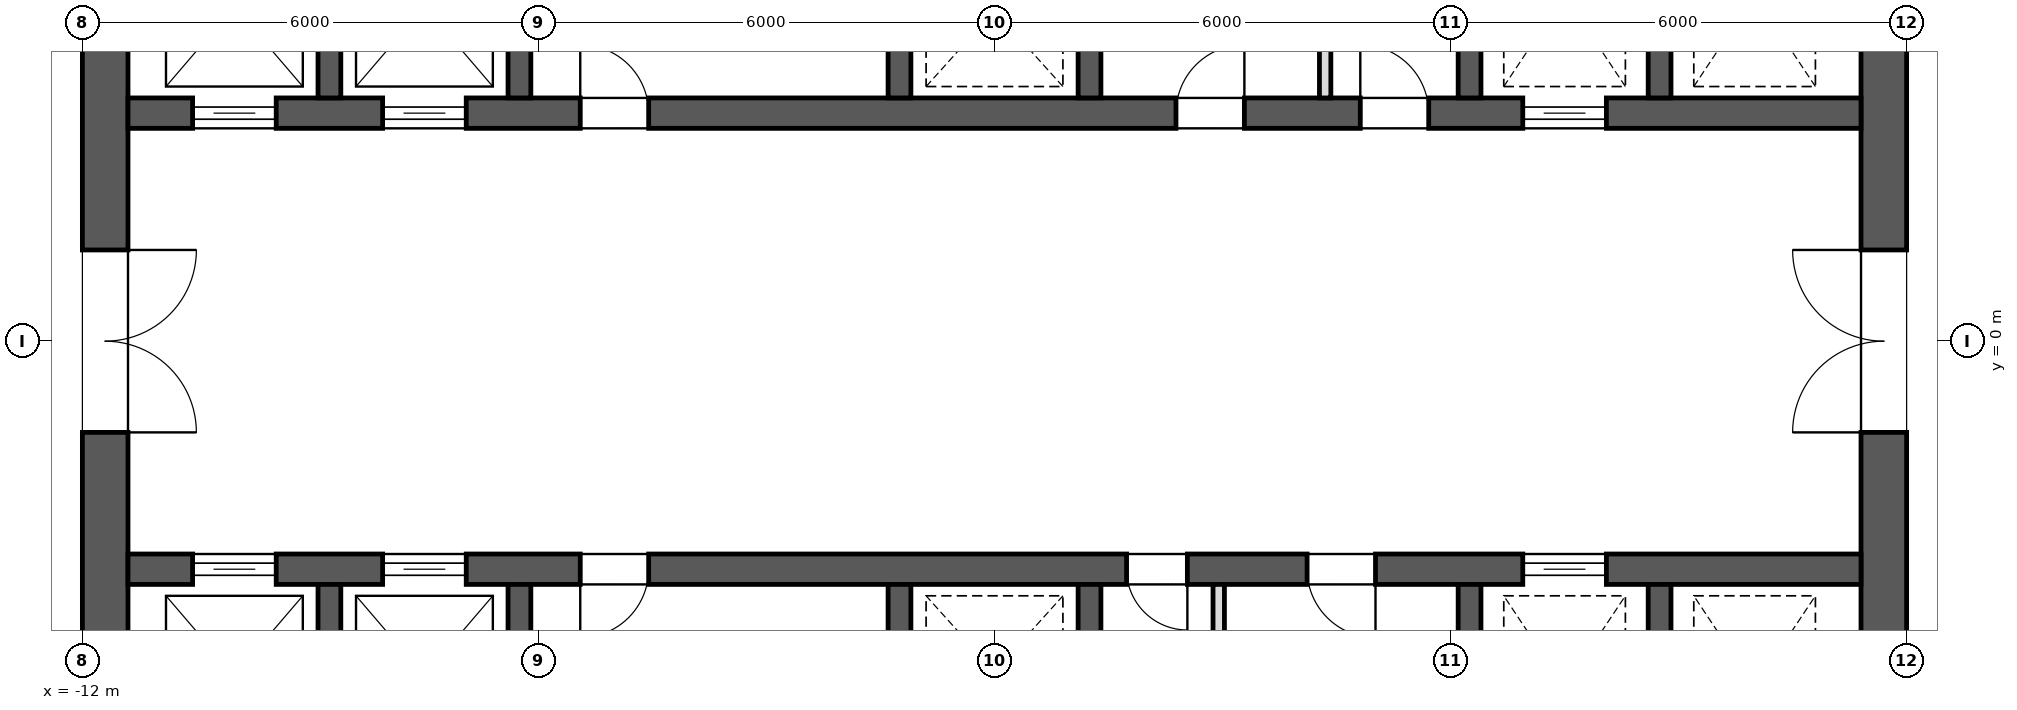
"""IFC4 building model, lengths in metres.
Left out: names, types, materials, properties, quantities, classifications, styles, units other than length and angle.
Written with IfcOpenShell. Run it as: python <this file> out.ifc"""

import sys

from ifc_helpers import new_model, si_unit, direction, frame, frame_2d, origin, place, context, subcontext, project, spatial, rectangle, extrude, element, fill, save


model = new_model("IFC4")
c1 = context("Model", 3, precision=1e-05, world=origin(), true_north=direction((0.0, 1.0)))
c2 = subcontext(c1, "Body", "Model", "MODEL_VIEW")
j1 = project(units=[si_unit("LENGTHUNIT", "METRE"), si_unit("PLANEANGLEUNIT", "RADIAN")], contexts=[c1])
p1 = place(None, origin())
s1 = spatial("IfcSite", under=j1, at=p1, CompositionType="ELEMENT")
p2 = place(p1, origin())
s2 = spatial("IfcBuilding", under=s1, at=p2, CompositionType="ELEMENT")
p3 = place(p2, frame((0.0, 0.0, 256.3)))
s3 = spatial("IfcBuildingStorey", under=s2, at=p3, CompositionType="ELEMENT", Elevation=256.3)
p4 = place(p3, frame((11.7, -11.4, 0.0), z_axis=(0.0, 0.0, 1.0), x_axis=(0.0, 1.0, 0.0)))
e1 = element("IfcWall", 1, at=p4, inside=s3, PredefinedType="SHEAR", context=c2, shape_type="SweptSolid", body=[
    extrude(rectangle(XDim=22.8, YDim=0.6, at=frame_2d((11.4, 0.0))), origin(), (0.0, 0.0, 1.0), 4.0),
])
p5 = place(p4, frame((10.2, 0.0, 0.0)))
e2 = element("IfcOpeningElement", 2, at=p5, cuts=e1, PredefinedType="OPENING", context=c2, shape_type="SweptSolid", body=[
    extrude(rectangle(XDim=2.4, YDim=2.1, at=frame_2d((1.2, 1.05))), frame((0.0, 0.312, 0.0), z_axis=(0.0, -1.0, 0.0), x_axis=(1.0, 0.0, 0.0)), (0.0, 0.0, 1.0), 0.624),
])
p6 = place(p4, frame((19.5, 0.0, 0.0)))
e3 = element("IfcOpeningElement", 3, at=p6, cuts=e1, PredefinedType="OPENING", context=c2, shape_type="SweptSolid", body=[
    extrude(rectangle(XDim=1.2, YDim=2.1, at=frame_2d((0.6, 1.05))), frame((0.0, 0.312, 0.0), z_axis=(0.0, -1.0, 0.0), x_axis=(1.0, 0.0, 0.0)), (0.0, 0.0, 1.0), 0.624),
])
p7 = place(p4, frame((2.1, 0.0, 0.0)))
e4 = element("IfcOpeningElement", 4, at=p7, cuts=e1, PredefinedType="OPENING", context=c2, shape_type="SweptSolid", body=[
    extrude(rectangle(XDim=1.2, YDim=2.1, at=frame_2d((0.6, 1.05))), frame((0.0, 0.312, 0.0), z_axis=(0.0, -1.0, 0.0), x_axis=(1.0, 0.0, 0.0)), (0.0, 0.0, 1.0), 0.624),
])
p8 = place(p3, frame((-11.7, -11.4, 0.0), z_axis=(0.0, 0.0, 1.0), x_axis=(0.0, 1.0, 0.0)))
e5 = element("IfcWall", 5, at=p8, inside=s3, PredefinedType="SHEAR", context=c2, shape_type="SweptSolid", body=[
    extrude(rectangle(XDim=22.8, YDim=0.6, at=frame_2d((11.4, 0.0))), origin(), (0.0, 0.0, 1.0), 4.0),
])
p9 = place(p8, frame((10.2, 0.0, 0.0)))
e6 = element("IfcOpeningElement", 6, at=p9, cuts=e5, PredefinedType="OPENING", context=c2, shape_type="SweptSolid", body=[
    extrude(rectangle(XDim=2.4, YDim=2.1, at=frame_2d((1.2, 1.05))), frame((0.0, 0.312, 0.0), z_axis=(0.0, -1.0, 0.0), x_axis=(1.0, 0.0, 0.0)), (0.0, 0.0, 1.0), 0.624),
])
p10 = place(p8, frame((18.925, 0.0, 0.0)))
e7 = element("IfcOpeningElement", 7, at=p10, cuts=e5, PredefinedType="OPENING", context=c2, shape_type="SweptSolid", body=[
    extrude(rectangle(XDim=1.2, YDim=2.1, at=frame_2d((0.6, 1.05))), frame((0.0, 0.312, 0.0), z_axis=(0.0, -1.0, 0.0), x_axis=(1.0, 0.0, 0.0)), (0.0, 0.0, 1.0), 0.624),
])
p11 = place(p8, frame((2.675, 0.0, 0.0)))
e8 = element("IfcOpeningElement", 8, at=p11, cuts=e5, PredefinedType="OPENING", context=c2, shape_type="SweptSolid", body=[
    extrude(rectangle(XDim=1.2, YDim=2.1, at=frame_2d((0.6, 1.05))), frame((0.0, 0.312, 0.0), z_axis=(0.0, -1.0, 0.0), x_axis=(1.0, 0.0, 0.0)), (0.0, 0.0, 1.0), 0.624),
])
p12 = place(p3, frame((-11.4, 3.0, 0.0), z_axis=(0.0, 0.0, 1.0), x_axis=(1.0, 0.0, 0.0)))
e9 = element("IfcWall", 9, at=p12, inside=s3, PredefinedType="SHEAR", context=c2, shape_type="SweptSolid", body=[
    extrude(rectangle(XDim=22.8, YDim=0.4, at=frame_2d((11.4, 0.0))), origin(), (0.0, 0.0, 1.0), 4.0),
])
p13 = place(p12, frame((0.85, 0.0, 0.0)))
e10 = element("IfcOpeningElement", 10, at=p13, cuts=e9, PredefinedType="OPENING", context=c2, shape_type="SweptSolid", body=[
    extrude(rectangle(XDim=1.1, YDim=2.1, at=frame_2d((0.55, 1.05))), frame((0.0, 0.212, 0.0), z_axis=(0.0, -1.0, 0.0), x_axis=(1.0, 0.0, 0.0)), (0.0, 0.0, 1.0), 0.424),
])
p14 = place(p12, frame((3.35, 0.0, 0.0)))
e11 = element("IfcOpeningElement", 11, at=p14, cuts=e9, PredefinedType="OPENING", context=c2, shape_type="SweptSolid", body=[
    extrude(rectangle(XDim=1.1, YDim=2.1, at=frame_2d((0.55, 1.05))), frame((0.0, 0.212, 0.0), z_axis=(0.0, -1.0, 0.0), x_axis=(1.0, 0.0, 0.0)), (0.0, 0.0, 1.0), 0.424),
])
p15 = place(p12, frame((18.35, 0.0, 0.0)))
e12 = element("IfcOpeningElement", 12, at=p15, cuts=e9, PredefinedType="OPENING", context=c2, shape_type="SweptSolid", body=[
    extrude(rectangle(XDim=1.1, YDim=2.1, at=frame_2d((0.55, 1.05))), frame((0.0, 0.212, 0.0), z_axis=(0.0, -1.0, 0.0), x_axis=(1.0, 0.0, 0.0)), (0.0, 0.0, 1.0), 0.424),
])
p16 = place(p12, frame((13.788, 0.0, 0.0)))
e13 = element("IfcOpeningElement", 13, at=p16, cuts=e9, PredefinedType="OPENING", context=c2, shape_type="SweptSolid", body=[
    extrude(rectangle(XDim=0.9, YDim=2.1, at=frame_2d((0.45, 1.05))), frame((0.0, 0.212, 0.0), z_axis=(0.0, -1.0, 0.0), x_axis=(1.0, 0.0, 0.0)), (0.0, 0.0, 1.0), 0.424),
])
p17 = place(p12, frame((16.212, 0.0, 0.0)))
e14 = element("IfcOpeningElement", 14, at=p17, cuts=e9, PredefinedType="OPENING", context=c2, shape_type="SweptSolid", body=[
    extrude(rectangle(XDim=0.9, YDim=2.1, at=frame_2d((0.45, 1.05))), frame((0.0, 0.212, 0.0), z_axis=(0.0, -1.0, 0.0), x_axis=(1.0, 0.0, 0.0)), (0.0, 0.0, 1.0), 0.424),
])
p18 = place(p12, frame((5.95, 0.0, 0.0)))
e15 = element("IfcOpeningElement", 15, at=p18, cuts=e9, PredefinedType="OPENING", context=c2, shape_type="SweptSolid", body=[
    extrude(rectangle(XDim=0.9, YDim=2.1, at=frame_2d((0.45, 1.05))), frame((0.0, 0.212, 0.0), z_axis=(0.0, -1.0, 0.0), x_axis=(1.0, 0.0, 0.0)), (0.0, 0.0, 1.0), 0.424),
])
for number, where, z_axis, x_axis in (
    (16, (-8.75, 3.2, 0.0), (0.0, 0.0, 1.0), (0.0, 1.0, 0.0)),
    (17, (-6.25, 3.2, 0.0), (0.0, 0.0, 1.0), (0.0, 1.0, 0.0)),
    (18, (-1.25, 3.2, 0.0), (0.0, 0.0, 1.0), (0.0, 1.0, 0.0)),
    (19, (1.25, 3.2, 0.0), (0.0, 0.0, 1.0), (0.0, 1.0, 0.0)),
    (20, (6.25, 3.2, 0.0), (0.0, 0.0, 1.0), (0.0, 1.0, 0.0)),
    (21, (8.75, 3.2, 0.0), (0.0, 0.0, 1.0), (0.0, 1.0, 0.0)),
):
    element("IfcWall", number, at=place(p3, frame(where, z_axis=z_axis, x_axis=x_axis)), inside=s3, PredefinedType="SHEAR", context=c2, shape_type="SweptSolid", body=[
        extrude(rectangle(XDim=2.9, YDim=0.3, at=frame_2d((1.45, 0.0))), origin(), (0.0, 0.0, 1.0), 4.0),
    ])
p19 = place(p3, frame((-11.4, -3.0, 0.0), z_axis=(0.0, 0.0, 1.0), x_axis=(1.0, 0.0, 0.0)))
e22 = element("IfcWall", 22, at=p19, inside=s3, PredefinedType="SHEAR", context=c2, shape_type="SweptSolid", body=[
    extrude(rectangle(XDim=22.8, YDim=0.4, at=frame_2d((11.4, 0.0))), origin(), (0.0, 0.0, 1.0), 4.0),
])
p20 = place(p19, frame((0.85, 0.0, 0.0)))
e23 = element("IfcOpeningElement", 23, at=p20, cuts=e22, PredefinedType="OPENING", context=c2, shape_type="SweptSolid", body=[
    extrude(rectangle(XDim=1.1, YDim=2.1, at=frame_2d((0.55, 1.05))), frame((0.0, 0.212, 0.0), z_axis=(0.0, -1.0, 0.0), x_axis=(1.0, 0.0, 0.0)), (0.0, 0.0, 1.0), 0.424),
])
p21 = place(p19, frame((3.35, 0.0, 0.0)))
e24 = element("IfcOpeningElement", 24, at=p21, cuts=e22, PredefinedType="OPENING", context=c2, shape_type="SweptSolid", body=[
    extrude(rectangle(XDim=1.1, YDim=2.1, at=frame_2d((0.55, 1.05))), frame((0.0, 0.212, 0.0), z_axis=(0.0, -1.0, 0.0), x_axis=(1.0, 0.0, 0.0)), (0.0, 0.0, 1.0), 0.424),
])
p22 = place(p19, frame((18.35, 0.0, 0.0)))
e25 = element("IfcOpeningElement", 25, at=p22, cuts=e22, PredefinedType="OPENING", context=c2, shape_type="SweptSolid", body=[
    extrude(rectangle(XDim=1.1, YDim=2.1, at=frame_2d((0.55, 1.05))), frame((0.0, 0.212, 0.0), z_axis=(0.0, -1.0, 0.0), x_axis=(1.0, 0.0, 0.0)), (0.0, 0.0, 1.0), 0.424),
])
p23 = place(p19, frame((13.137, 0.0, 0.0)))
e26 = element("IfcOpeningElement", 26, at=p23, cuts=e22, PredefinedType="OPENING", context=c2, shape_type="SweptSolid", body=[
    extrude(rectangle(XDim=0.8, YDim=2.1, at=frame_2d((0.4, 1.05))), frame((0.0, 0.212, 0.0), z_axis=(0.0, -1.0, 0.0), x_axis=(1.0, 0.0, 0.0)), (0.0, 0.0, 1.0), 0.424),
])
p24 = place(p19, frame((15.512, 0.0, 0.0)))
e27 = element("IfcOpeningElement", 27, at=p24, cuts=e22, PredefinedType="OPENING", context=c2, shape_type="SweptSolid", body=[
    extrude(rectangle(XDim=0.9, YDim=2.1, at=frame_2d((0.45, 1.05))), frame((0.0, 0.212, 0.0), z_axis=(0.0, -1.0, 0.0), x_axis=(1.0, 0.0, 0.0)), (0.0, 0.0, 1.0), 0.424),
])
p25 = place(p19, frame((5.95, 0.0, 0.0)))
e28 = element("IfcOpeningElement", 28, at=p25, cuts=e22, PredefinedType="OPENING", context=c2, shape_type="SweptSolid", body=[
    extrude(rectangle(XDim=0.9, YDim=2.1, at=frame_2d((0.45, 1.05))), frame((0.0, 0.212, 0.0), z_axis=(0.0, -1.0, 0.0), x_axis=(1.0, 0.0, 0.0)), (0.0, 0.0, 1.0), 0.424),
])
for number, where, z_axis, x_axis in (
    (29, (-8.75, -6.1, 0.0), (0.0, 0.0, 1.0), (0.0, 1.0, 0.0)),
    (30, (-6.25, -6.1, 0.0), (0.0, 0.0, 1.0), (0.0, 1.0, 0.0)),
    (31, (-1.25, -6.1, 0.0), (0.0, 0.0, 1.0), (0.0, 1.0, 0.0)),
    (32, (1.25, -6.1, 0.0), (0.0, 0.0, 1.0), (0.0, 1.0, 0.0)),
    (33, (6.25, -6.1, 0.0), (0.0, 0.0, 1.0), (0.0, 1.0, 0.0)),
    (34, (8.75, -6.1, 0.0), (0.0, 0.0, 1.0), (0.0, 1.0, 0.0)),
):
    element("IfcWall", number, at=place(p3, frame(where, z_axis=z_axis, x_axis=x_axis)), inside=s3, PredefinedType="SHEAR", context=c2, shape_type="SweptSolid", body=[
        extrude(rectangle(XDim=2.9, YDim=0.3, at=frame_2d((1.45, 0.0))), origin(), (0.0, 0.0, 1.0), 4.0),
    ])
for number, where, z_axis, x_axis in (
    (35, (4.35, 3.2, 0.0), (0.0, 0.0, 1.0), (0.0, 1.0, 0.0)),
    (36, (2.95, -6.1, 0.0), (0.0, 0.0, 1.0), (0.0, 1.0, 0.0)),
):
    element("IfcWall", number, at=place(p3, frame(where, z_axis=z_axis, x_axis=x_axis)), inside=s3, PredefinedType="PARTITIONING", context=c2, shape_type="SweptSolid", body=[
        extrude(rectangle(XDim=2.9, YDim=0.15, at=frame_2d((1.45, 0.0))), origin(), (0.0, 0.0, 1.0), 3.7),
    ])
p26 = place(p13, origin())
e37 = element("IfcDoor", 37, at=p26, inside=s3, OperationType="SLIDING_TO_LEFT", PredefinedType="DOOR", context=c2, shape_type="SweptSolid", body=[
    extrude(rectangle(XDim=1.1, YDim=2.1, at=frame_2d((0.55, 1.05))), frame((0.0, 0.025, 0.0), z_axis=(0.0, -1.0, 0.0), x_axis=(1.0, 0.0, 0.0)), (0.0, 0.0, 1.0), 0.05),
])
fill(e10, e37)
p27 = place(p14, origin())
e38 = element("IfcDoor", 38, at=p27, inside=s3, OperationType="SLIDING_TO_LEFT", PredefinedType="DOOR", context=c2, shape_type="SweptSolid", body=[
    extrude(rectangle(XDim=1.1, YDim=2.1, at=frame_2d((0.55, 1.05))), frame((0.0, 0.025, 0.0), z_axis=(0.0, -1.0, 0.0), x_axis=(1.0, 0.0, 0.0)), (0.0, 0.0, 1.0), 0.05),
])
fill(e11, e38)
p28 = place(p20, origin())
e39 = element("IfcDoor", 39, at=p28, inside=s3, OperationType="SLIDING_TO_LEFT", PredefinedType="DOOR", context=c2, shape_type="SweptSolid", body=[
    extrude(rectangle(XDim=1.1, YDim=2.1, at=frame_2d((0.55, 1.05))), frame((0.0, 0.025, 0.0), z_axis=(0.0, -1.0, 0.0), x_axis=(1.0, 0.0, 0.0)), (0.0, 0.0, 1.0), 0.05),
])
fill(e23, e39)
p29 = place(p21, origin())
e40 = element("IfcDoor", 40, at=p29, inside=s3, OperationType="SLIDING_TO_LEFT", PredefinedType="DOOR", context=c2, shape_type="SweptSolid", body=[
    extrude(rectangle(XDim=1.1, YDim=2.1, at=frame_2d((0.55, 1.05))), frame((0.0, 0.025, 0.0), z_axis=(0.0, -1.0, 0.0), x_axis=(1.0, 0.0, 0.0)), (0.0, 0.0, 1.0), 0.05),
])
fill(e24, e40)
p30 = place(p15, origin())
e41 = element("IfcDoor", 41, at=p30, inside=s3, OperationType="SLIDING_TO_LEFT", PredefinedType="DOOR", context=c2, shape_type="SweptSolid", body=[
    extrude(rectangle(XDim=1.1, YDim=2.1, at=frame_2d((0.55, 1.05))), frame((0.0, 0.025, 0.0), z_axis=(0.0, -1.0, 0.0), x_axis=(1.0, 0.0, 0.0)), (0.0, 0.0, 1.0), 0.05),
])
fill(e12, e41)
p31 = place(p22, origin())
e42 = element("IfcDoor", 42, at=p31, inside=s3, OperationType="SLIDING_TO_LEFT", PredefinedType="DOOR", context=c2, shape_type="SweptSolid", body=[
    extrude(rectangle(XDim=1.1, YDim=2.1, at=frame_2d((0.55, 1.05))), frame((0.0, 0.025, 0.0), z_axis=(0.0, -1.0, 0.0), x_axis=(1.0, 0.0, 0.0)), (0.0, 0.0, 1.0), 0.05),
])
fill(e25, e42)
p32 = place(p9, frame((2.4, 0.0, 0.0), z_axis=(0.0, 0.0, 1.0), x_axis=(-1.0, 0.0, 0.0)))
e43 = element("IfcDoor", 43, at=p32, inside=s3, OperationType="DOUBLE_DOOR_SINGLE_SWING", PredefinedType="DOOR", context=c2, shape_type="SweptSolid", body=[
    extrude(rectangle(XDim=2.4, YDim=2.1, at=frame_2d((1.2, 1.05))), frame((0.0, 0.025, 0.0), z_axis=(0.0, -1.0, 0.0), x_axis=(1.0, 0.0, 0.0)), (0.0, 0.0, 1.0), 0.05),
])
fill(e6, e43)
p33 = place(p5, origin())
e44 = element("IfcDoor", 44, at=p33, inside=s3, OperationType="DOUBLE_DOOR_SINGLE_SWING", PredefinedType="DOOR", context=c2, shape_type="SweptSolid", body=[
    extrude(rectangle(XDim=2.4, YDim=2.1, at=frame_2d((1.2, 1.05))), frame((0.0, 0.025, 0.0), z_axis=(0.0, -1.0, 0.0), x_axis=(1.0, 0.0, 0.0)), (0.0, 0.0, 1.0), 0.05),
])
fill(e2, e44)
p34 = place(p16, origin())
e45 = element("IfcDoor", 45, at=p34, inside=s3, OperationType="SINGLE_SWING_LEFT", PredefinedType="DOOR", context=c2, shape_type="SweptSolid", body=[
    extrude(rectangle(XDim=0.9, YDim=2.1, at=frame_2d((0.45, 1.05))), frame((0.0, 0.025, 0.0), z_axis=(0.0, -1.0, 0.0), x_axis=(1.0, 0.0, 0.0)), (0.0, 0.0, 1.0), 0.05),
])
fill(e13, e45)
p35 = place(p17, origin())
e46 = element("IfcDoor", 46, at=p35, inside=s3, OperationType="SINGLE_SWING_RIGHT", PredefinedType="DOOR", context=c2, shape_type="SweptSolid", body=[
    extrude(rectangle(XDim=0.9, YDim=2.1, at=frame_2d((0.45, 1.05))), frame((0.0, 0.025, 0.0), z_axis=(0.0, -1.0, 0.0), x_axis=(1.0, 0.0, 0.0)), (0.0, 0.0, 1.0), 0.05),
])
fill(e14, e46)
p36 = place(p18, origin())
e47 = element("IfcDoor", 47, at=p36, inside=s3, OperationType="SINGLE_SWING_RIGHT", PredefinedType="DOOR", context=c2, shape_type="SweptSolid", body=[
    extrude(rectangle(XDim=0.9, YDim=2.1, at=frame_2d((0.45, 1.05))), frame((0.0, 0.025, 0.0), z_axis=(0.0, -1.0, 0.0), x_axis=(1.0, 0.0, 0.0)), (0.0, 0.0, 1.0), 0.05),
])
fill(e15, e47)
p37 = place(p23, frame((0.8, 0.0, 0.0), z_axis=(0.0, 0.0, 1.0), x_axis=(-1.0, 0.0, 0.0)))
e48 = element("IfcDoor", 48, at=p37, inside=s3, OperationType="SINGLE_SWING_RIGHT", PredefinedType="DOOR", context=c2, shape_type="SweptSolid", body=[
    extrude(rectangle(XDim=0.8, YDim=2.1, at=frame_2d((0.4, 1.05))), frame((0.0, 0.025, 0.0), z_axis=(0.0, -1.0, 0.0), x_axis=(1.0, 0.0, 0.0)), (0.0, 0.0, 1.0), 0.05),
])
fill(e26, e48)
p38 = place(p24, frame((0.9, 0.0, 0.0), z_axis=(0.0, 0.0, 1.0), x_axis=(-1.0, 0.0, 0.0)))
e49 = element("IfcDoor", 49, at=p38, inside=s3, OperationType="SINGLE_SWING_RIGHT", PredefinedType="DOOR", context=c2, shape_type="SweptSolid", body=[
    extrude(rectangle(XDim=0.9, YDim=2.1, at=frame_2d((0.45, 1.05))), frame((0.0, 0.025, 0.0), z_axis=(0.0, -1.0, 0.0), x_axis=(1.0, 0.0, 0.0)), (0.0, 0.0, 1.0), 0.05),
])
fill(e27, e49)
p39 = place(p25, frame((0.9, 0.0, 0.0), z_axis=(0.0, 0.0, 1.0), x_axis=(-1.0, 0.0, 0.0)))
e50 = element("IfcDoor", 50, at=p39, inside=s3, OperationType="SINGLE_SWING_LEFT", PredefinedType="DOOR", context=c2, shape_type="SweptSolid", body=[
    extrude(rectangle(XDim=0.9, YDim=2.1, at=frame_2d((0.45, 1.05))), frame((0.0, 0.025, 0.0), z_axis=(0.0, -1.0, 0.0), x_axis=(1.0, 0.0, 0.0)), (0.0, 0.0, 1.0), 0.05),
])
fill(e28, e50)
save(model, sys.argv[1])
